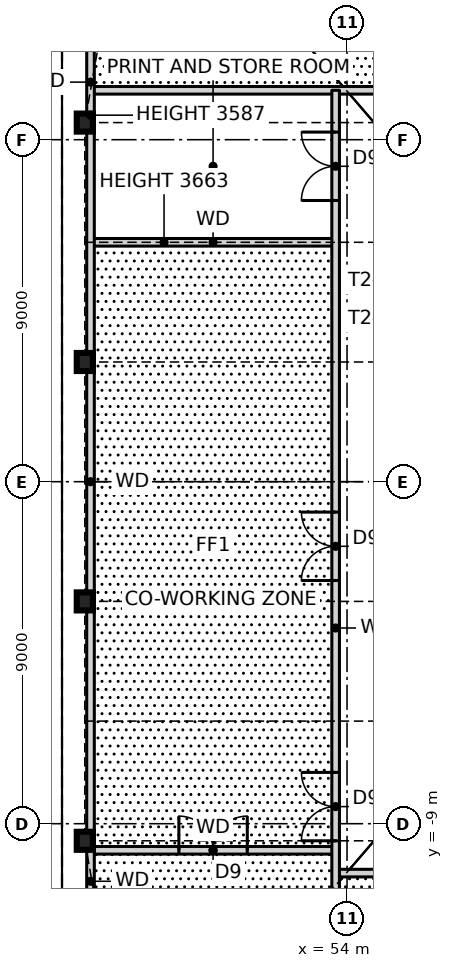
"""IFC4 building model, lengths in metres.
Left out: names, types, materials, properties, quantities, classifications, styles, units other than length and angle.
Written with IfcOpenShell. Run it as: python <this file> out.ifc"""

import sys

from ifc_helpers import new_model, si_unit, direction, frame, frame_2d, origin, origin_2d, place, context, subcontext, project, spatial, rectangle, i_section, extrude, element, fill, save


model = new_model("IFC4")
c1 = context("Model", 3, precision=1e-05, world=origin(), true_north=direction((0.0, 1.0)))
c2 = subcontext(c1, "Body", "Model", "MODEL_VIEW")
j1 = project(units=[si_unit("LENGTHUNIT", "METRE"), si_unit("PLANEANGLEUNIT", "RADIAN")], contexts=[c1])
p1 = place(None, origin())
s1 = spatial("IfcSite", under=j1, at=p1, CompositionType="ELEMENT")
p2 = place(p1, origin())
s2 = spatial("IfcBuilding", under=s1, at=p2, CompositionType="ELEMENT")
p3 = place(p2, frame((0.0, 0.0, 10.5)))
s3 = spatial("IfcBuildingStorey", under=s2, at=p3, CompositionType="ELEMENT", Elevation=10.5)
for number, where, z_axis, x_axis in (
    (1, (47.1, 9.45, 0.0), (0.0, 0.0, 1.0), (1.0, 0.0, 0.0)),
    (2, (47.1, 3.15, 0.0), (0.0, 0.0, 1.0), (1.0, 0.0, 0.0)),
    (3, (47.1, -3.15, 0.0), (0.0, 0.0, 1.0), (1.0, 0.0, 0.0)),
    (4, (47.1, -9.45, 0.0), (0.0, 0.0, 1.0), (1.0, 0.0, 0.0)),
):
    element("IfcColumn", number, at=place(p3, frame(where, z_axis=z_axis, x_axis=x_axis)), inside=s3, PredefinedType="COLUMN", context=c2, shape_type="SweptSolid", body=[
        extrude(i_section(OverallWidth=0.424, OverallDepth=0.475, WebThickness=0.048, FlangeThickness=0.077, at=origin_2d()), origin(), (0.0, 0.0, 1.0), 4.5),
    ])
p4 = place(p3, frame((53.7, -10.3, 0.0), z_axis=(0.0, 0.0, 1.0), x_axis=(1.0, 0.0, 0.0)))
e5 = element("IfcWall", 5, at=p4, inside=s3, PredefinedType="SOLIDWALL", context=c2, shape_type="SweptSolid", body=[
    extrude(rectangle(XDim=25.05, YDim=0.2, at=frame_2d((12.525, 0.0))), origin(), (0.0, 0.0, 1.0), 4.25),
])
p5 = place(p4, frame((6.6, 0.0, 0.0)))
e6 = element("IfcOpeningElement", 6, at=p5, cuts=e5, PredefinedType="OPENING", context=c2, shape_type="SweptSolid", body=[
    extrude(rectangle(XDim=1.8, YDim=2.1, at=frame_2d((0.9, 1.05))), frame((0.0, 0.11, 0.0), z_axis=(0.0, -1.0, 0.0), x_axis=(1.0, 0.0, 0.0)), (0.0, 0.0, 1.0), 0.22),
])
p6 = place(p4, frame((15.9, 0.0, 0.0)))
e7 = element("IfcOpeningElement", 7, at=p6, cuts=e5, PredefinedType="OPENING", context=c2, shape_type="SweptSolid", body=[
    extrude(rectangle(XDim=1.8, YDim=2.1, at=frame_2d((0.9, 1.05))), frame((0.0, 0.11, 0.0), z_axis=(0.0, -1.0, 0.0), x_axis=(1.0, 0.0, 0.0)), (0.0, 0.0, 1.0), 0.22),
])
p7 = place(p3, frame((47.25, -9.7, 0.0), z_axis=(0.0, 0.0, 1.0), x_axis=(1.0, 0.0, 0.0)))
e8 = element("IfcWall", 8, at=p7, inside=s3, PredefinedType="SOLIDWALL", context=c2, shape_type="SweptSolid", body=[
    extrude(rectangle(XDim=6.45, YDim=0.2, at=frame_2d((3.225, 0.0))), origin(), (0.0, 0.0, 1.0), 4.25),
])
p8 = place(p7, frame((2.325, 0.0, 0.0)))
e9 = element("IfcOpeningElement", 9, at=p8, cuts=e8, PredefinedType="OPENING", context=c2, shape_type="SweptSolid", body=[
    extrude(rectangle(XDim=1.8, YDim=2.1, at=frame_2d((0.9, 1.05))), frame((0.0, 0.11, 0.0), z_axis=(0.0, -1.0, 0.0), x_axis=(1.0, 0.0, 0.0)), (0.0, 0.0, 1.0), 0.22),
])
p9 = place(p3, frame((47.25, 6.3, 0.0), z_axis=(0.0, 0.0, 1.0), x_axis=(1.0, 0.0, 0.0)))
e10 = element("IfcWall", 10, at=p9, inside=s3, PredefinedType="SOLIDWALL", context=c2, shape_type="SweptSolid", body=[
    extrude(rectangle(XDim=6.45, YDim=0.2, at=frame_2d((3.225, 0.0))), origin(), (0.0, 0.0, 1.0), 3.663),
])
p10 = place(p3, frame((47.25, 10.3, 0.0), z_axis=(0.0, 0.0, 1.0), x_axis=(1.0, 0.0, 0.0)))
e11 = element("IfcWall", 11, at=p10, inside=s3, PredefinedType="SOLIDWALL", context=c2, shape_type="SweptSolid", body=[
    extrude(rectangle(XDim=25.05, YDim=0.2, at=frame_2d((12.525, 0.0))), origin(), (0.0, 0.0, 1.0), 4.25),
])
p11 = place(p10, frame((19.5, 0.0, 0.0)))
e12 = element("IfcOpeningElement", 12, at=p11, cuts=e11, PredefinedType="OPENING", context=c2, shape_type="SweptSolid", body=[
    extrude(rectangle(XDim=1.8, YDim=2.1, at=frame_2d((0.9, 1.05))), frame((0.0, 0.11, 0.0), z_axis=(0.0, -1.0, 0.0), x_axis=(1.0, 0.0, 0.0)), (0.0, 0.0, 1.0), 0.22),
])
p12 = place(p10, frame((13.65, 0.0, 0.0)))
e13 = element("IfcOpeningElement", 13, at=p12, cuts=e11, PredefinedType="OPENING", context=c2, shape_type="SweptSolid", body=[
    extrude(rectangle(XDim=1.8, YDim=2.1, at=frame_2d((0.9, 1.05))), frame((0.0, 0.11, 0.0), z_axis=(0.0, -1.0, 0.0), x_axis=(1.0, 0.0, 0.0)), (0.0, 0.0, 1.0), 0.22),
])
p13 = place(p10, frame((11.25, 0.0, 0.0)))
e14 = element("IfcOpeningElement", 14, at=p13, cuts=e11, PredefinedType="OPENING", context=c2, shape_type="SweptSolid", body=[
    extrude(rectangle(XDim=1.8, YDim=2.1, at=frame_2d((0.9, 1.05))), frame((0.0, 0.11, 0.0), z_axis=(0.0, -1.0, 0.0), x_axis=(1.0, 0.0, 0.0)), (0.0, 0.0, 1.0), 0.22),
])
p14 = place(p10, frame((7.8, 0.0, 0.0)))
e15 = element("IfcOpeningElement", 15, at=p14, cuts=e11, PredefinedType="OPENING", context=c2, shape_type="SweptSolid", body=[
    extrude(rectangle(XDim=1.8, YDim=2.1, at=frame_2d((0.9, 1.05))), frame((0.0, 0.11, 0.0), z_axis=(0.0, -1.0, 0.0), x_axis=(1.0, 0.0, 0.0)), (0.0, 0.0, 1.0), 0.22),
])
p15 = place(p3, frame((53.7, -18.0, 0.0), z_axis=(0.0, 0.0, 1.0), x_axis=(0.0, 1.0, 0.0)))
e16 = element("IfcWall", 16, at=p15, inside=s3, PredefinedType="SOLIDWALL", context=c2, shape_type="SweptSolid", body=[
    extrude(rectangle(XDim=28.3, YDim=0.2, at=frame_2d((14.15, 0.0))), origin(), (0.0, 0.0, 1.0), 4.25),
])
p16 = place(p15, frame((15.4, 0.0, 0.0)))
e17 = element("IfcOpeningElement", 17, at=p16, cuts=e16, PredefinedType="OPENING", context=c2, shape_type="SweptSolid", body=[
    extrude(rectangle(XDim=1.8, YDim=2.1, at=frame_2d((0.9, 1.05))), frame((0.0, 0.11, 0.0), z_axis=(0.0, -1.0, 0.0), x_axis=(1.0, 0.0, 0.0)), (0.0, 0.0, 1.0), 0.22),
])
p17 = place(p15, frame((25.4, 0.0, 0.0)))
e18 = element("IfcOpeningElement", 18, at=p17, cuts=e16, PredefinedType="OPENING", context=c2, shape_type="SweptSolid", body=[
    extrude(rectangle(XDim=1.8, YDim=2.1, at=frame_2d((0.9, 1.05))), frame((0.0, 0.11, 0.0), z_axis=(0.0, -1.0, 0.0), x_axis=(1.0, 0.0, 0.0)), (0.0, 0.0, 1.0), 0.22),
])
p18 = place(p15, frame((8.55, 0.0, 0.0)))
e19 = element("IfcOpeningElement", 19, at=p18, cuts=e16, PredefinedType="OPENING", context=c2, shape_type="SweptSolid", body=[
    extrude(rectangle(XDim=1.8, YDim=2.1, at=frame_2d((0.9, 1.05))), frame((0.0, 0.11, 0.0), z_axis=(0.0, -1.0, 0.0), x_axis=(1.0, 0.0, 0.0)), (0.0, 0.0, 1.0), 0.22),
])
p19 = place(p3, frame((47.25, -11.602, 0.0), z_axis=(0.0, 0.0, 1.0), x_axis=(0.0, 1.0, 0.0)))
e20 = element("IfcWall", 20, at=p19, inside=s3, PredefinedType="SOLIDWALL", context=c2, shape_type="SweptSolid", body=[
    extrude(rectangle(XDim=2.174, YDim=0.2, at=frame_2d((1.087, 0.0))), origin(), (0.0, 0.0, 1.0), 3.587),
])
p20 = place(p3, frame((47.25, -9.428, 0.0), z_axis=(0.0, 0.0, 1.0), x_axis=(0.0, 1.0, 0.0)))
e21 = element("IfcWall", 21, at=p20, inside=s3, PredefinedType="SOLIDWALL", context=c2, shape_type="SweptSolid", body=[
    extrude(rectangle(XDim=18.856, YDim=0.2, at=frame_2d((9.428, 0.0))), origin(), (0.0, 0.0, 1.0), 4.25),
])
p21 = place(p3, frame((47.25, 9.428, 0.0), z_axis=(0.0, 0.0, 1.0), x_axis=(0.0, 1.0, 0.0)))
e22 = element("IfcWall", 22, at=p21, inside=s3, PredefinedType="SOLIDWALL", context=c2, shape_type="SweptSolid", body=[
    extrude(rectangle(XDim=2.174, YDim=0.2, at=frame_2d((1.087, 0.0))), origin(), (0.0, 0.0, 1.0), 3.587),
])
p22 = place(p16, origin())
e23 = element("IfcDoor", 23, at=p22, inside=s3, OperationType="DOUBLE_DOOR_SINGLE_SWING", PredefinedType="DOOR", context=c2, shape_type="SweptSolid", body=[
    extrude(rectangle(XDim=1.8, YDim=2.1, at=frame_2d((0.9, 1.05))), frame((0.0, 0.025, 0.0), z_axis=(0.0, -1.0, 0.0), x_axis=(1.0, 0.0, 0.0)), (0.0, 0.0, 1.0), 0.05),
])
fill(e17, e23)
p23 = place(p17, origin())
e24 = element("IfcDoor", 24, at=p23, inside=s3, OperationType="DOUBLE_DOOR_SINGLE_SWING", PredefinedType="DOOR", context=c2, shape_type="SweptSolid", body=[
    extrude(rectangle(XDim=1.8, YDim=2.1, at=frame_2d((0.9, 1.05))), frame((0.0, 0.025, 0.0), z_axis=(0.0, -1.0, 0.0), x_axis=(1.0, 0.0, 0.0)), (0.0, 0.0, 1.0), 0.05),
])
fill(e18, e24)
p24 = place(p18, origin())
e25 = element("IfcDoor", 25, at=p24, inside=s3, OperationType="DOUBLE_DOOR_SINGLE_SWING", PredefinedType="DOOR", context=c2, shape_type="SweptSolid", body=[
    extrude(rectangle(XDim=1.8, YDim=2.1, at=frame_2d((0.9, 1.05))), frame((0.0, 0.025, 0.0), z_axis=(0.0, -1.0, 0.0), x_axis=(1.0, 0.0, 0.0)), (0.0, 0.0, 1.0), 0.05),
])
fill(e19, e25)
p25 = place(p8, origin())
e26 = element("IfcDoor", 26, at=p25, inside=s3, OperationType="DOUBLE_DOOR_SINGLE_SWING", PredefinedType="DOOR", context=c2, shape_type="SweptSolid", body=[
    extrude(rectangle(XDim=1.8, YDim=2.1, at=frame_2d((0.9, 1.05))), frame((0.0, 0.025, 0.0), z_axis=(0.0, -1.0, 0.0), x_axis=(1.0, 0.0, 0.0)), (0.0, 0.0, 1.0), 0.05),
])
fill(e9, e26)
save(model, sys.argv[1])
